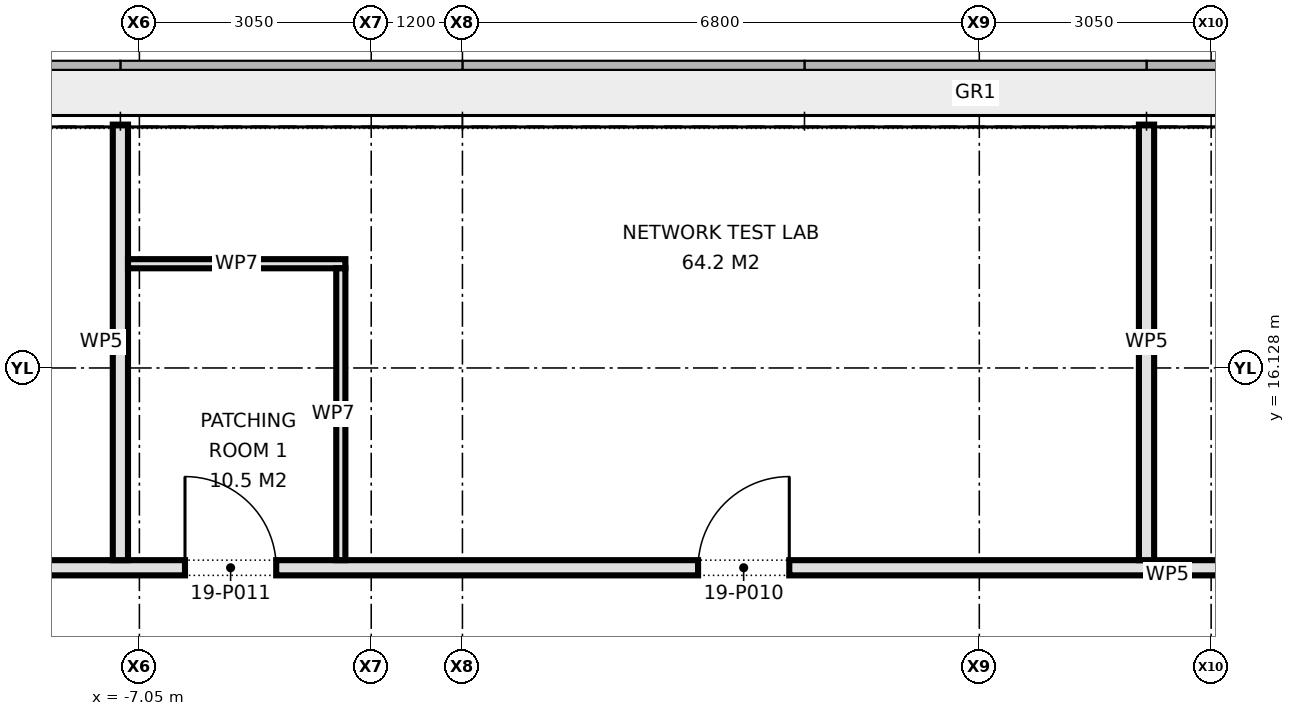
"""IFC4 building model, lengths in metres.
Left out: names, types, materials, properties, quantities, classifications, styles, units other than length and angle.
Written with IfcOpenShell. Run it as: python <this file> out.ifc"""

import sys

from ifc_helpers import new_model, si_unit, direction, frame, frame_2d, origin, place, context, subcontext, project, spatial, rectangle, extrude, element, fill, save


model = new_model("IFC4")
c1 = context("Model", 3, precision=1e-05, world=origin(), true_north=direction((0.0, 1.0)))
c2 = subcontext(c1, "Body", "Model", "MODEL_VIEW")
j1 = project(units=[si_unit("LENGTHUNIT", "METRE"), si_unit("PLANEANGLEUNIT", "RADIAN")], contexts=[c1])
p1 = place(None, origin())
s1 = spatial("IfcSite", under=j1, at=p1, CompositionType="ELEMENT")
p2 = place(p1, origin())
s2 = spatial("IfcBuilding", under=s1, at=p2, CompositionType="ELEMENT")
p3 = place(p2, frame((0.0, 0.0, 86.4)))
s3 = spatial("IfcBuildingStorey", under=s2, at=p3, CompositionType="ELEMENT", Elevation=86.4)
p4 = place(p3, frame((-18.6, 13.5, 0.0), z_axis=(0.0, 0.0, 1.0), x_axis=(1.0, 0.0, 0.0)))
e1 = element("IfcWall", 1, at=p4, inside=s3, PredefinedType="PARTITIONING", context=c2, shape_type="SweptSolid", body=[
    extrude(rectangle(XDim=37.2, YDim=0.2, at=frame_2d((18.6, 0.0))), origin(), (0.0, 0.0, 1.0), 4.2),
])
p5 = place(p4, frame((5.1, 0.0, 0.0)))
e2 = element("IfcOpeningElement", 2, at=p5, cuts=e1, PredefinedType="OPENING", context=c2, shape_type="SweptSolid", body=[
    extrude(rectangle(XDim=1.2, YDim=2.1, at=frame_2d((0.6, 1.05))), frame((0.0, 0.11, 0.0), z_axis=(0.0, -1.0, 0.0), x_axis=(1.0, 0.0, 0.0)), (0.0, 0.0, 1.0), 0.22),
])
p6 = place(p4, frame((18.9, 0.0, 0.0)))
e3 = element("IfcOpeningElement", 3, at=p6, cuts=e1, PredefinedType="OPENING", context=c2, shape_type="SweptSolid", body=[
    extrude(rectangle(XDim=1.2, YDim=2.1, at=frame_2d((0.6, 1.05))), frame((0.0, 0.11, 0.0), z_axis=(0.0, -1.0, 0.0), x_axis=(1.0, 0.0, 0.0)), (0.0, 0.0, 1.0), 0.22),
])
p7 = place(p4, frame((12.15, 0.0, 0.0)))
e4 = element("IfcOpeningElement", 4, at=p7, cuts=e1, PredefinedType="OPENING", context=c2, shape_type="SweptSolid", body=[
    extrude(rectangle(XDim=1.2, YDim=2.1, at=frame_2d((0.6, 1.05))), frame((0.0, 0.11, 0.0), z_axis=(0.0, -1.0, 0.0), x_axis=(1.0, 0.0, 0.0)), (0.0, 0.0, 1.0), 0.22),
])
p8 = place(p4, frame((30.05, 0.0, 0.0)))
e5 = element("IfcOpeningElement", 5, at=p8, cuts=e1, PredefinedType="OPENING", context=c2, shape_type="SweptSolid", body=[
    extrude(rectangle(XDim=1.8, YDim=2.1, at=frame_2d((0.9, 1.05))), frame((0.0, 0.11, 0.0), z_axis=(0.0, -1.0, 0.0), x_axis=(1.0, 0.0, 0.0)), (0.0, 0.0, 1.0), 0.22),
])
for number, where, z_axis, x_axis in (
    (6, (6.2, 13.6, 0.0), (0.0, 0.0, 1.0), (0.0, 1.0, 0.0)),
    (7, (-7.3, 13.6, 0.0), (0.0, 0.0, 1.0), (0.0, 1.0, 0.0)),
):
    element("IfcWall", number, at=place(p3, frame(where, z_axis=z_axis, x_axis=x_axis)), inside=s3, PredefinedType="PARTITIONING", context=c2, shape_type="SweptSolid", body=[
        extrude(rectangle(XDim=5.73, YDim=0.2, at=frame_2d((2.865, 0.0))), origin(), (0.0, 0.0, 1.0), 4.2),
    ])
p9 = place(p3, frame((-7.2, 17.5, 0.0), z_axis=(0.0, 0.0, 1.0), x_axis=(1.0, 0.0, 0.0)))
e8 = element("IfcWall", 8, at=p9, inside=s3, PredefinedType="PARTITIONING", context=c2, shape_type="SweptSolid", body=[
    extrude(rectangle(XDim=2.86, YDim=0.12, at=frame_2d((1.43, 0.0))), origin(), (0.0, 0.0, 1.0), 4.2),
])
p10 = place(p3, frame((-4.4, 13.6, 0.0), z_axis=(0.0, 0.0, 1.0), x_axis=(0.0, 1.0, 0.0)))
e9 = element("IfcWall", 9, at=p10, inside=s3, PredefinedType="PARTITIONING", context=c2, shape_type="SweptSolid", body=[
    extrude(rectangle(XDim=3.84, YDim=0.12, at=frame_2d((1.92, 0.0))), origin(), (0.0, 0.0, 1.0), 4.2),
])
p11 = place(p6, origin())
e10 = element("IfcDoor", 10, at=p11, inside=s3, OperationType="SINGLE_SWING_RIGHT", PredefinedType="DOOR", context=c2, shape_type="SweptSolid", body=[
    extrude(rectangle(XDim=1.2, YDim=2.1, at=frame_2d((0.6, 1.05))), frame((0.0, 0.025, 0.0), z_axis=(0.0, -1.0, 0.0), x_axis=(1.0, 0.0, 0.0)), (0.0, 0.0, 1.0), 0.05),
])
fill(e3, e10)
p12 = place(p7, origin())
e11 = element("IfcDoor", 11, at=p12, inside=s3, OperationType="SINGLE_SWING_LEFT", PredefinedType="DOOR", context=c2, shape_type="SweptSolid", body=[
    extrude(rectangle(XDim=1.2, YDim=2.1, at=frame_2d((0.6, 1.05))), frame((0.0, 0.025, 0.0), z_axis=(0.0, -1.0, 0.0), x_axis=(1.0, 0.0, 0.0)), (0.0, 0.0, 1.0), 0.05),
])
fill(e4, e11)
save(model, sys.argv[1])
